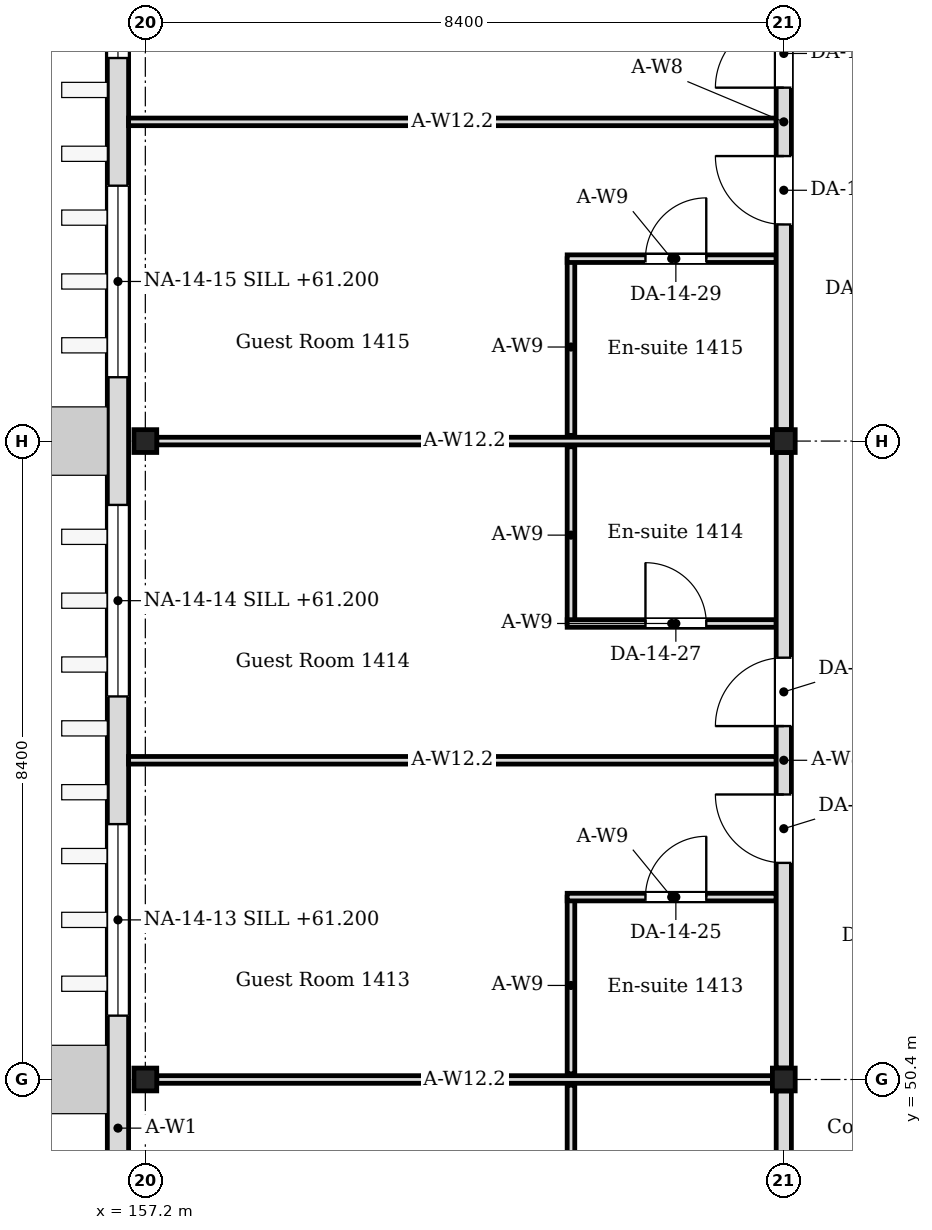
"""IFC4 building model, lengths in metres.
Left out: names, types, materials, properties, quantities, classifications, styles, units other than length and angle.
Written with IfcOpenShell. Run it as: python <this file> out.ifc"""

import sys

from ifc_helpers import new_model, si_unit, direction, frame, frame_2d, origin, origin_2d, place, context, subcontext, project, spatial, rectangle, i_section, extrude, element, fill, save


model = new_model("IFC4")
c1 = context("Model", 3, precision=1e-05, world=origin(), true_north=direction((0.0, 1.0)))
c2 = subcontext(c1, "Body", "Model", "MODEL_VIEW")
j1 = project(units=[si_unit("LENGTHUNIT", "METRE"), si_unit("PLANEANGLEUNIT", "RADIAN")], contexts=[c1])
p1 = place(None, origin())
s1 = spatial("IfcSite", under=j1, at=p1, CompositionType="ELEMENT")
p2 = place(p1, origin())
s2 = spatial("IfcBuilding", under=s1, at=p2, CompositionType="ELEMENT")
p3 = place(p2, frame((0.0, 0.0, 60.6)))
s3 = spatial("IfcBuildingStorey", under=s2, at=p3, CompositionType="ELEMENT", Elevation=60.6)
for number, where, z_axis, x_axis in (
    (1, (157.2, 50.4, 0.0), (0.0, 0.0, 1.0), (1.0, 0.0, 0.0)),
    (2, (157.2, 58.8, 0.0), (0.0, 0.0, 1.0), (1.0, 0.0, 0.0)),
    (3, (165.6, 50.4, 0.0), (0.0, 0.0, 1.0), (1.0, 0.0, 0.0)),
    (4, (165.6, 58.8, 0.0), (0.0, 0.0, 1.0), (1.0, 0.0, 0.0)),
):
    element("IfcColumn", number, at=place(p3, frame(where, z_axis=z_axis, x_axis=x_axis)), inside=s3, PredefinedType="COLUMN", context=c2, shape_type="SweptSolid", body=[
        extrude(i_section(OverallWidth=0.3, OverallDepth=0.3, WebThickness=0.01, FlangeThickness=0.015, FilletRadius=0.013, at=origin_2d()), origin(), (0.0, 0.0, 1.0), 4.2),
    ])
p4 = place(p3, frame((156.84, -0.22, 0.0), z_axis=(0.0, 0.0, 1.0), x_axis=(0.0, 1.0, 0.0)))
e5 = element("IfcWall", 5, at=p4, inside=s3, PredefinedType="SOLIDWALL", context=c2, shape_type="SweptSolid", body=[
    extrude(rectangle(XDim=67.64, YDim=0.28, at=frame_2d((33.82, 0.0))), origin(), (0.0, 0.0, 1.0), 4.05),
])
p5 = place(p4, frame((0.64, 0.0, 0.6)))
e6 = element("IfcOpeningElement", 6, at=p5, cuts=e5, PredefinedType="OPENING", context=c2, shape_type="SweptSolid", body=[
    extrude(rectangle(XDim=2.52, YDim=2.4, at=frame_2d((1.26, 1.2))), frame((0.0, 0.15, 0.0), z_axis=(0.0, -1.0, 0.0), x_axis=(1.0, 0.0, 0.0)), (0.0, 0.0, 1.0), 0.3),
])
p6 = place(p4, frame((4.84, 0.0, 0.6)))
e7 = element("IfcOpeningElement", 7, at=p6, cuts=e5, PredefinedType="OPENING", context=c2, shape_type="SweptSolid", body=[
    extrude(rectangle(XDim=2.52, YDim=2.4, at=frame_2d((1.26, 1.2))), frame((0.0, 0.15, 0.0), z_axis=(0.0, -1.0, 0.0), x_axis=(1.0, 0.0, 0.0)), (0.0, 0.0, 1.0), 0.3),
])
p7 = place(p4, frame((9.46, 0.0, 0.6)))
e8 = element("IfcOpeningElement", 8, at=p7, cuts=e5, PredefinedType="OPENING", context=c2, shape_type="SweptSolid", body=[
    extrude(rectangle(XDim=2.52, YDim=2.4, at=frame_2d((1.26, 1.2))), frame((0.0, 0.15, 0.0), z_axis=(0.0, -1.0, 0.0), x_axis=(1.0, 0.0, 0.0)), (0.0, 0.0, 1.0), 0.3),
])
p8 = place(p4, frame((13.66, 0.0, 0.6)))
e9 = element("IfcOpeningElement", 9, at=p8, cuts=e5, PredefinedType="OPENING", context=c2, shape_type="SweptSolid", body=[
    extrude(rectangle(XDim=2.52, YDim=2.4, at=frame_2d((1.26, 1.2))), frame((0.0, 0.15, 0.0), z_axis=(0.0, -1.0, 0.0), x_axis=(1.0, 0.0, 0.0)), (0.0, 0.0, 1.0), 0.3),
])
p9 = place(p4, frame((17.86, 0.0, 0.6)))
e10 = element("IfcOpeningElement", 10, at=p9, cuts=e5, PredefinedType="OPENING", context=c2, shape_type="SweptSolid", body=[
    extrude(rectangle(XDim=2.52, YDim=2.4, at=frame_2d((1.26, 1.2))), frame((0.0, 0.15, 0.0), z_axis=(0.0, -1.0, 0.0), x_axis=(1.0, 0.0, 0.0)), (0.0, 0.0, 1.0), 0.3),
])
p10 = place(p4, frame((22.06, 0.0, 0.6)))
e11 = element("IfcOpeningElement", 11, at=p10, cuts=e5, PredefinedType="OPENING", context=c2, shape_type="SweptSolid", body=[
    extrude(rectangle(XDim=2.52, YDim=2.4, at=frame_2d((1.26, 1.2))), frame((0.0, 0.15, 0.0), z_axis=(0.0, -1.0, 0.0), x_axis=(1.0, 0.0, 0.0)), (0.0, 0.0, 1.0), 0.3),
])
p11 = place(p4, frame((25.84, 0.0, 0.6)))
e12 = element("IfcOpeningElement", 12, at=p11, cuts=e5, PredefinedType="OPENING", context=c2, shape_type="SweptSolid", body=[
    extrude(rectangle(XDim=2.52, YDim=2.4, at=frame_2d((1.26, 1.2))), frame((0.0, 0.15, 0.0), z_axis=(0.0, -1.0, 0.0), x_axis=(1.0, 0.0, 0.0)), (0.0, 0.0, 1.0), 0.3),
])
p12 = place(p4, frame((30.04, 0.0, 0.6)))
e13 = element("IfcOpeningElement", 13, at=p12, cuts=e5, PredefinedType="OPENING", context=c2, shape_type="SweptSolid", body=[
    extrude(rectangle(XDim=2.52, YDim=2.4, at=frame_2d((1.26, 1.2))), frame((0.0, 0.15, 0.0), z_axis=(0.0, -1.0, 0.0), x_axis=(1.0, 0.0, 0.0)), (0.0, 0.0, 1.0), 0.3),
])
p13 = place(p4, frame((34.66, 0.0, 0.6)))
e14 = element("IfcOpeningElement", 14, at=p13, cuts=e5, PredefinedType="OPENING", context=c2, shape_type="SweptSolid", body=[
    extrude(rectangle(XDim=2.52, YDim=2.4, at=frame_2d((1.26, 1.2))), frame((0.0, 0.15, 0.0), z_axis=(0.0, -1.0, 0.0), x_axis=(1.0, 0.0, 0.0)), (0.0, 0.0, 1.0), 0.3),
])
p14 = place(p4, frame((38.86, 0.0, 0.6)))
e15 = element("IfcOpeningElement", 15, at=p14, cuts=e5, PredefinedType="OPENING", context=c2, shape_type="SweptSolid", body=[
    extrude(rectangle(XDim=2.52, YDim=2.4, at=frame_2d((1.26, 1.2))), frame((0.0, 0.15, 0.0), z_axis=(0.0, -1.0, 0.0), x_axis=(1.0, 0.0, 0.0)), (0.0, 0.0, 1.0), 0.3),
])
p15 = place(p4, frame((42.64, 0.0, 0.6)))
e16 = element("IfcOpeningElement", 16, at=p15, cuts=e5, PredefinedType="OPENING", context=c2, shape_type="SweptSolid", body=[
    extrude(rectangle(XDim=2.52, YDim=2.4, at=frame_2d((1.26, 1.2))), frame((0.0, 0.15, 0.0), z_axis=(0.0, -1.0, 0.0), x_axis=(1.0, 0.0, 0.0)), (0.0, 0.0, 1.0), 0.3),
])
p16 = place(p4, frame((46.84, 0.0, 0.6)))
e17 = element("IfcOpeningElement", 17, at=p16, cuts=e5, PredefinedType="OPENING", context=c2, shape_type="SweptSolid", body=[
    extrude(rectangle(XDim=2.52, YDim=2.4, at=frame_2d((1.26, 1.2))), frame((0.0, 0.15, 0.0), z_axis=(0.0, -1.0, 0.0), x_axis=(1.0, 0.0, 0.0)), (0.0, 0.0, 1.0), 0.3),
])
p17 = place(p4, frame((51.46, 0.0, 0.6)))
e18 = element("IfcOpeningElement", 18, at=p17, cuts=e5, PredefinedType="OPENING", context=c2, shape_type="SweptSolid", body=[
    extrude(rectangle(XDim=2.52, YDim=2.4, at=frame_2d((1.26, 1.2))), frame((0.0, 0.15, 0.0), z_axis=(0.0, -1.0, 0.0), x_axis=(1.0, 0.0, 0.0)), (0.0, 0.0, 1.0), 0.3),
])
p18 = place(p4, frame((55.66, 0.0, 0.6)))
e19 = element("IfcOpeningElement", 19, at=p18, cuts=e5, PredefinedType="OPENING", context=c2, shape_type="SweptSolid", body=[
    extrude(rectangle(XDim=2.52, YDim=2.4, at=frame_2d((1.26, 1.2))), frame((0.0, 0.15, 0.0), z_axis=(0.0, -1.0, 0.0), x_axis=(1.0, 0.0, 0.0)), (0.0, 0.0, 1.0), 0.3),
])
p19 = place(p4, frame((59.86, 0.0, 0.6)))
e20 = element("IfcOpeningElement", 20, at=p19, cuts=e5, PredefinedType="OPENING", context=c2, shape_type="SweptSolid", body=[
    extrude(rectangle(XDim=2.52, YDim=2.4, at=frame_2d((1.26, 1.2))), frame((0.0, 0.15, 0.0), z_axis=(0.0, -1.0, 0.0), x_axis=(1.0, 0.0, 0.0)), (0.0, 0.0, 1.0), 0.3),
])
p20 = place(p4, frame((64.06, 0.0, 0.6)))
e21 = element("IfcOpeningElement", 21, at=p20, cuts=e5, PredefinedType="OPENING", context=c2, shape_type="SweptSolid", body=[
    extrude(rectangle(XDim=2.52, YDim=2.4, at=frame_2d((1.26, 1.2))), frame((0.0, 0.15, 0.0), z_axis=(0.0, -1.0, 0.0), x_axis=(1.0, 0.0, 0.0)), (0.0, 0.0, 1.0), 0.3),
])
for number, where, z_axis, x_axis in (
    (22, (162.8, 48.0, 0.0), (0.0, 0.0, 1.0), (0.0, 1.0, 0.0)),
    (23, (162.8, 50.475, 0.0), (0.0, 0.0, 1.0), (0.0, 1.0, 0.0)),
):
    element("IfcWall", number, at=place(p3, frame(where, z_axis=z_axis, x_axis=x_axis)), inside=s3, PredefinedType="PARTITIONING", context=c2, shape_type="SweptSolid", body=[
        extrude(rectangle(XDim=2.325, YDim=0.1, at=frame_2d((1.163, 0.0))), origin(), (0.0, 0.0, 1.0), 4.05),
    ])
p21 = place(p3, frame((162.75, 52.8, 0.0), z_axis=(0.0, 0.0, 1.0), x_axis=(1.0, 0.0, 0.0)))
e24 = element("IfcWall", 24, at=p21, inside=s3, PredefinedType="PARTITIONING", context=c2, shape_type="SweptSolid", body=[
    extrude(rectangle(XDim=2.75, YDim=0.1, at=frame_2d((1.375, 0.0))), origin(), (0.0, 0.0, 1.0), 4.05),
])
p22 = place(p21, frame((1.03, 0.0, 0.0)))
e25 = element("IfcOpeningElement", 25, at=p22, cuts=e24, PredefinedType="OPENING", context=c2, shape_type="SweptSolid", body=[
    extrude(rectangle(XDim=0.8, YDim=2.1, at=frame_2d((0.4, 1.05))), frame((0.0, 0.06, 0.0), z_axis=(0.0, -1.0, 0.0), x_axis=(1.0, 0.0, 0.0)), (0.0, 0.0, 1.0), 0.12),
])
p23 = place(p3, frame((162.8, 56.4, 0.0), z_axis=(0.0, 0.0, 1.0), x_axis=(0.0, 1.0, 0.0)))
e26 = element("IfcWall", 26, at=p23, inside=s3, PredefinedType="PARTITIONING", context=c2, shape_type="SweptSolid", body=[
    extrude(rectangle(XDim=2.325, YDim=0.1, at=frame_2d((1.163, 0.0))), origin(), (0.0, 0.0, 1.0), 4.05),
])
p24 = place(p3, frame((162.75, 56.4, 0.0), z_axis=(0.0, 0.0, 1.0), x_axis=(1.0, 0.0, 0.0)))
e27 = element("IfcWall", 27, at=p24, inside=s3, PredefinedType="PARTITIONING", context=c2, shape_type="SweptSolid", body=[
    extrude(rectangle(XDim=2.75, YDim=0.1, at=frame_2d((1.375, 0.0))), origin(), (0.0, 0.0, 1.0), 4.05),
])
p25 = place(p24, frame((1.03, 0.0, 0.0)))
e28 = element("IfcOpeningElement", 28, at=p25, cuts=e27, PredefinedType="OPENING", context=c2, shape_type="SweptSolid", body=[
    extrude(rectangle(XDim=0.8, YDim=2.1, at=frame_2d((0.4, 1.05))), frame((0.0, 0.06, 0.0), z_axis=(0.0, -1.0, 0.0), x_axis=(1.0, 0.0, 0.0)), (0.0, 0.0, 1.0), 0.12),
])
p26 = place(p3, frame((162.8, 58.875, 0.0), z_axis=(0.0, 0.0, 1.0), x_axis=(0.0, 1.0, 0.0)))
e29 = element("IfcWall", 29, at=p26, inside=s3, PredefinedType="PARTITIONING", context=c2, shape_type="SweptSolid", body=[
    extrude(rectangle(XDim=2.325, YDim=0.1, at=frame_2d((1.163, 0.0))), origin(), (0.0, 0.0, 1.0), 4.05),
])
p27 = place(p3, frame((162.75, 61.2, 0.0), z_axis=(0.0, 0.0, 1.0), x_axis=(1.0, 0.0, 0.0)))
e30 = element("IfcWall", 30, at=p27, inside=s3, PredefinedType="PARTITIONING", context=c2, shape_type="SweptSolid", body=[
    extrude(rectangle(XDim=2.75, YDim=0.1, at=frame_2d((1.375, 0.0))), origin(), (0.0, 0.0, 1.0), 4.05),
])
p28 = place(p27, frame((1.03, 0.0, 0.0)))
e31 = element("IfcOpeningElement", 31, at=p28, cuts=e30, PredefinedType="OPENING", context=c2, shape_type="SweptSolid", body=[
    extrude(rectangle(XDim=0.8, YDim=2.1, at=frame_2d((0.4, 1.05))), frame((0.0, 0.06, 0.0), z_axis=(0.0, -1.0, 0.0), x_axis=(1.0, 0.0, 0.0)), (0.0, 0.0, 1.0), 0.12),
])
for number, where, z_axis, x_axis in (
    (32, (157.35, 50.4, 0.0), (0.0, 0.0, 1.0), (1.0, 0.0, 0.0)),
    (33, (157.35, 58.8, 0.0), (0.0, 0.0, 1.0), (1.0, 0.0, 0.0)),
):
    element("IfcWall", number, at=place(p3, frame(where, z_axis=z_axis, x_axis=x_axis)), inside=s3, PredefinedType="PARTITIONING", context=c2, shape_type="SweptSolid", body=[
        extrude(rectangle(XDim=8.1, YDim=0.1, at=frame_2d((4.05, 0.0))), origin(), (0.0, 0.0, 1.0), 3.55),
    ])
for number, where, z_axis, x_axis in (
    (34, (156.98, 54.6, 0.0), (0.0, 0.0, 1.0), (1.0, 0.0, 0.0)),
    (35, (156.98, 63.0, 0.0), (0.0, 0.0, 1.0), (1.0, 0.0, 0.0)),
):
    element("IfcWall", number, at=place(p3, frame(where, z_axis=z_axis, x_axis=x_axis)), inside=s3, PredefinedType="PARTITIONING", context=c2, shape_type="SweptSolid", body=[
        extrude(rectangle(XDim=8.52, YDim=0.1, at=frame_2d((4.26, 0.0))), origin(), (0.0, 0.0, 1.0), 3.55),
    ])
p29 = place(p3, frame((165.6, 42.15, 0.0), z_axis=(0.0, 0.0, 1.0), x_axis=(0.0, 1.0, 0.0)))
e36 = element("IfcWall", 36, at=p29, inside=s3, PredefinedType="PARTITIONING", context=c2, shape_type="SweptSolid", body=[
    extrude(rectangle(XDim=8.1, YDim=0.2, at=frame_2d((4.05, 0.0))), origin(), (0.0, 0.0, 1.0), 3.45),
])
p30 = place(p29, frame((2.08, 0.0, 0.0)))
e37 = element("IfcOpeningElement", 37, at=p30, cuts=e36, PredefinedType="OPENING", context=c2, shape_type="SweptSolid", body=[
    extrude(rectangle(XDim=0.9, YDim=2.1, at=frame_2d((0.45, 1.05))), frame((0.0, 0.11, 0.0), z_axis=(0.0, -1.0, 0.0), x_axis=(1.0, 0.0, 0.0)), (0.0, 0.0, 1.0), 0.22),
])
p31 = place(p29, frame((4.08, 0.0, 0.0)))
e38 = element("IfcOpeningElement", 38, at=p31, cuts=e36, PredefinedType="OPENING", context=c2, shape_type="SweptSolid", body=[
    extrude(rectangle(XDim=0.9, YDim=2.1, at=frame_2d((0.45, 1.05))), frame((0.0, 0.11, 0.0), z_axis=(0.0, -1.0, 0.0), x_axis=(1.0, 0.0, 0.0)), (0.0, 0.0, 1.0), 0.22),
])
p32 = place(p3, frame((165.6, 50.55, 0.0), z_axis=(0.0, 0.0, 1.0), x_axis=(0.0, 1.0, 0.0)))
e39 = element("IfcWall", 39, at=p32, inside=s3, PredefinedType="PARTITIONING", context=c2, shape_type="SweptSolid", body=[
    extrude(rectangle(XDim=8.1, YDim=0.2, at=frame_2d((4.05, 0.0))), origin(), (0.0, 0.0, 1.0), 3.45),
])
p33 = place(p32, frame((2.7, 0.0, 0.0)))
e40 = element("IfcOpeningElement", 40, at=p33, cuts=e39, PredefinedType="OPENING", context=c2, shape_type="SweptSolid", body=[
    extrude(rectangle(XDim=0.9, YDim=2.1, at=frame_2d((0.45, 1.05))), frame((0.0, 0.11, 0.0), z_axis=(0.0, -1.0, 0.0), x_axis=(1.0, 0.0, 0.0)), (0.0, 0.0, 1.0), 0.22),
])
p34 = place(p32, frame((4.5, 0.0, 0.0)))
e41 = element("IfcOpeningElement", 41, at=p34, cuts=e39, PredefinedType="OPENING", context=c2, shape_type="SweptSolid", body=[
    extrude(rectangle(XDim=0.9, YDim=2.1, at=frame_2d((0.45, 1.05))), frame((0.0, 0.11, 0.0), z_axis=(0.0, -1.0, 0.0), x_axis=(1.0, 0.0, 0.0)), (0.0, 0.0, 1.0), 0.22),
])
p35 = place(p3, frame((165.6, 58.95, 0.0), z_axis=(0.0, 0.0, 1.0), x_axis=(0.0, 1.0, 0.0)))
e42 = element("IfcWall", 42, at=p35, inside=s3, PredefinedType="PARTITIONING", context=c2, shape_type="SweptSolid", body=[
    extrude(rectangle(XDim=8.1, YDim=0.2, at=frame_2d((4.05, 0.0))), origin(), (0.0, 0.0, 1.0), 3.45),
])
p36 = place(p35, frame((2.7, 0.0, 0.0)))
e43 = element("IfcOpeningElement", 43, at=p36, cuts=e42, PredefinedType="OPENING", context=c2, shape_type="SweptSolid", body=[
    extrude(rectangle(XDim=0.9, YDim=2.1, at=frame_2d((0.45, 1.05))), frame((0.0, 0.11, 0.0), z_axis=(0.0, -1.0, 0.0), x_axis=(1.0, 0.0, 0.0)), (0.0, 0.0, 1.0), 0.22),
])
p37 = place(p35, frame((4.5, 0.0, 0.0)))
e44 = element("IfcOpeningElement", 44, at=p37, cuts=e42, PredefinedType="OPENING", context=c2, shape_type="SweptSolid", body=[
    extrude(rectangle(XDim=0.9, YDim=2.1, at=frame_2d((0.45, 1.05))), frame((0.0, 0.11, 0.0), z_axis=(0.0, -1.0, 0.0), x_axis=(1.0, 0.0, 0.0)), (0.0, 0.0, 1.0), 0.22),
])
p38 = place(p17, origin())
e45 = element("IfcWindow", 45, at=p38, inside=s3, PartitioningType="SINGLE_PANEL", PredefinedType="WINDOW", context=c2, shape_type="SweptSolid", body=[
    extrude(rectangle(XDim=2.52, YDim=2.4, at=frame_2d((1.26, 1.2))), frame((0.0, 0.03, 0.0), z_axis=(0.0, -1.0, 0.0), x_axis=(1.0, 0.0, 0.0)), (0.0, 0.0, 1.0), 0.06),
])
fill(e18, e45)
p39 = place(p18, origin())
e46 = element("IfcWindow", 46, at=p39, inside=s3, PartitioningType="SINGLE_PANEL", PredefinedType="WINDOW", context=c2, shape_type="SweptSolid", body=[
    extrude(rectangle(XDim=2.52, YDim=2.4, at=frame_2d((1.26, 1.2))), frame((0.0, 0.03, 0.0), z_axis=(0.0, -1.0, 0.0), x_axis=(1.0, 0.0, 0.0)), (0.0, 0.0, 1.0), 0.06),
])
fill(e19, e46)
p40 = place(p19, origin())
e47 = element("IfcWindow", 47, at=p40, inside=s3, PartitioningType="SINGLE_PANEL", PredefinedType="WINDOW", context=c2, shape_type="SweptSolid", body=[
    extrude(rectangle(XDim=2.52, YDim=2.4, at=frame_2d((1.26, 1.2))), frame((0.0, 0.03, 0.0), z_axis=(0.0, -1.0, 0.0), x_axis=(1.0, 0.0, 0.0)), (0.0, 0.0, 1.0), 0.06),
])
fill(e20, e47)
p41 = place(p20, origin())
e48 = element("IfcWindow", 48, at=p41, inside=s3, PartitioningType="SINGLE_PANEL", PredefinedType="WINDOW", context=c2, shape_type="SweptSolid", body=[
    extrude(rectangle(XDim=2.52, YDim=2.4, at=frame_2d((1.26, 1.2))), frame((0.0, 0.03, 0.0), z_axis=(0.0, -1.0, 0.0), x_axis=(1.0, 0.0, 0.0)), (0.0, 0.0, 1.0), 0.06),
])
fill(e21, e48)
p42 = place(p22, origin())
e49 = element("IfcDoor", 49, at=p42, inside=s3, OperationType="SINGLE_SWING_RIGHT", PredefinedType="DOOR", context=c2, shape_type="SweptSolid", body=[
    extrude(rectangle(XDim=0.8, YDim=2.1, at=frame_2d((0.4, 1.05))), frame((0.0, 0.025, 0.0), z_axis=(0.0, -1.0, 0.0), x_axis=(1.0, 0.0, 0.0)), (0.0, 0.0, 1.0), 0.05),
])
fill(e25, e49)
p43 = place(p33, origin())
e50 = element("IfcDoor", 50, at=p43, inside=s3, OperationType="SINGLE_SWING_RIGHT", PredefinedType="DOOR", context=c2, shape_type="SweptSolid", body=[
    extrude(rectangle(XDim=0.9, YDim=2.1, at=frame_2d((0.45, 1.05))), frame((0.0, 0.025, 0.0), z_axis=(0.0, -1.0, 0.0), x_axis=(1.0, 0.0, 0.0)), (0.0, 0.0, 1.0), 0.05),
])
fill(e40, e50)
p44 = place(p25, origin())
e51 = element("IfcDoor", 51, at=p44, inside=s3, OperationType="SINGLE_SWING_LEFT", PredefinedType="DOOR", context=c2, shape_type="SweptSolid", body=[
    extrude(rectangle(XDim=0.8, YDim=2.1, at=frame_2d((0.4, 1.05))), frame((0.0, 0.025, 0.0), z_axis=(0.0, -1.0, 0.0), x_axis=(1.0, 0.0, 0.0)), (0.0, 0.0, 1.0), 0.05),
])
fill(e28, e51)
p45 = place(p34, origin())
e52 = element("IfcDoor", 52, at=p45, inside=s3, OperationType="SINGLE_SWING_LEFT", PredefinedType="DOOR", context=c2, shape_type="SweptSolid", body=[
    extrude(rectangle(XDim=0.9, YDim=2.1, at=frame_2d((0.45, 1.05))), frame((0.0, 0.025, 0.0), z_axis=(0.0, -1.0, 0.0), x_axis=(1.0, 0.0, 0.0)), (0.0, 0.0, 1.0), 0.05),
])
fill(e41, e52)
p46 = place(p28, origin())
e53 = element("IfcDoor", 53, at=p46, inside=s3, OperationType="SINGLE_SWING_RIGHT", PredefinedType="DOOR", context=c2, shape_type="SweptSolid", body=[
    extrude(rectangle(XDim=0.8, YDim=2.1, at=frame_2d((0.4, 1.05))), frame((0.0, 0.025, 0.0), z_axis=(0.0, -1.0, 0.0), x_axis=(1.0, 0.0, 0.0)), (0.0, 0.0, 1.0), 0.05),
])
fill(e31, e53)
p47 = place(p36, origin())
e54 = element("IfcDoor", 54, at=p47, inside=s3, OperationType="SINGLE_SWING_RIGHT", PredefinedType="DOOR", context=c2, shape_type="SweptSolid", body=[
    extrude(rectangle(XDim=0.9, YDim=2.1, at=frame_2d((0.45, 1.05))), frame((0.0, 0.025, 0.0), z_axis=(0.0, -1.0, 0.0), x_axis=(1.0, 0.0, 0.0)), (0.0, 0.0, 1.0), 0.05),
])
fill(e43, e54)
p48 = place(p37, origin())
e55 = element("IfcDoor", 55, at=p48, inside=s3, OperationType="SINGLE_SWING_LEFT", PredefinedType="DOOR", context=c2, shape_type="SweptSolid", body=[
    extrude(rectangle(XDim=0.9, YDim=2.1, at=frame_2d((0.45, 1.05))), frame((0.0, 0.025, 0.0), z_axis=(0.0, -1.0, 0.0), x_axis=(1.0, 0.0, 0.0)), (0.0, 0.0, 1.0), 0.05),
])
fill(e44, e55)
save(model, sys.argv[1])
